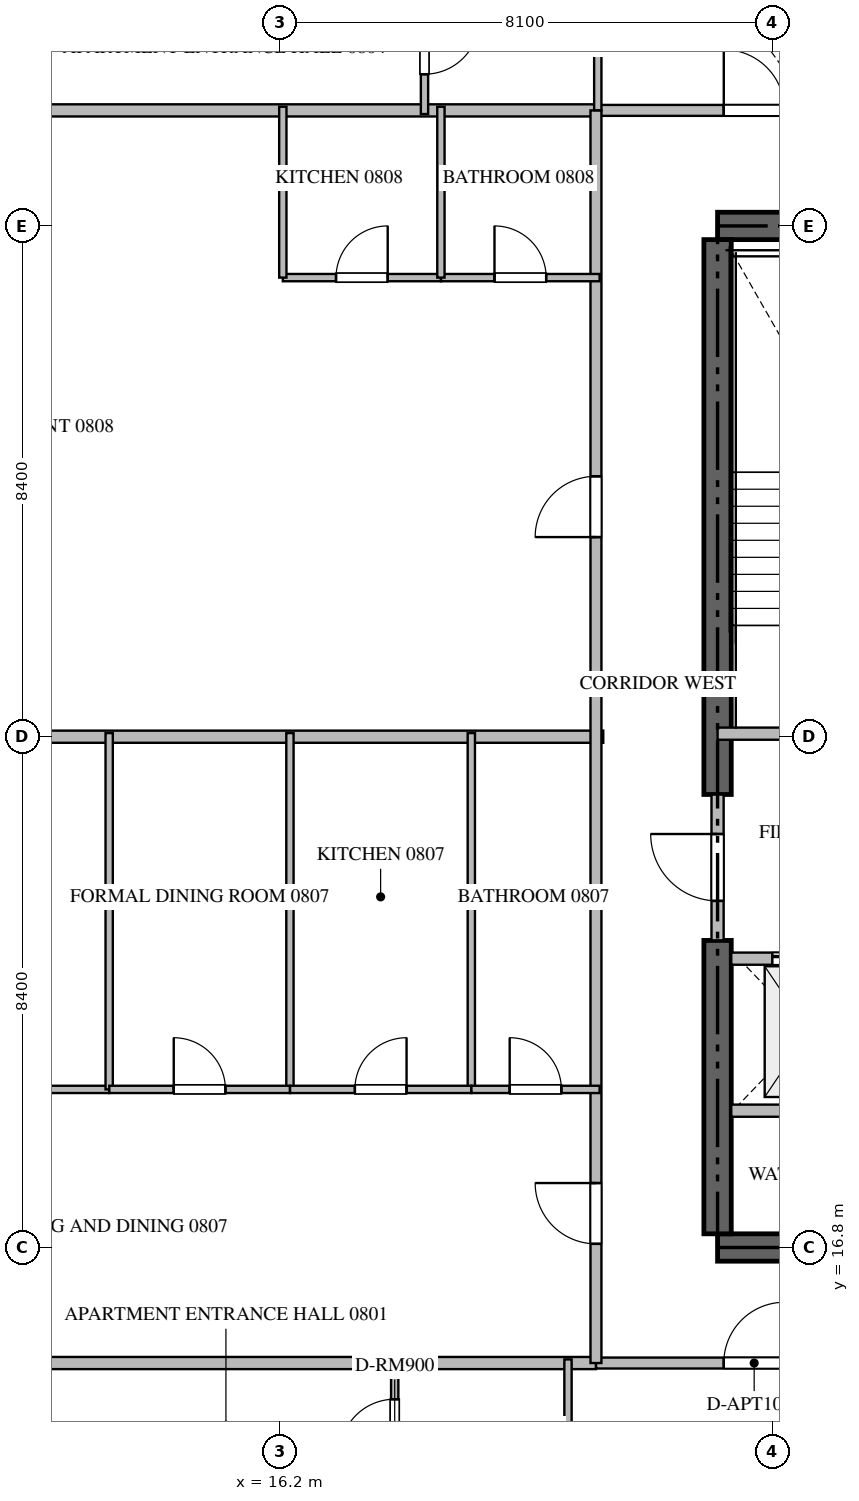
"""IFC4 building model, lengths in metres.
Left out: names, types, materials, properties, quantities, classifications, styles, units other than length and angle.
Written with IfcOpenShell. Run it as: python <this file> out.ifc"""

import sys

from ifc_helpers import new_model, si_unit, direction, frame, frame_2d, origin, place, context, subcontext, project, spatial, rectangle, extrude, source, transform, mapped, element, fill, save


model = new_model("IFC4")
c1 = context("Model", 3, precision=1e-05, world=origin(), true_north=direction((0.0, 1.0)))
c2 = subcontext(c1, "Body", "Model", "MODEL_VIEW")
j1 = project(units=[si_unit("LENGTHUNIT", "METRE"), si_unit("PLANEANGLEUNIT", "RADIAN")], contexts=[c1])
p1 = place(None, origin())
s1 = spatial("IfcSite", under=j1, at=p1, CompositionType="ELEMENT")
p2 = place(p1, origin())
s2 = spatial("IfcBuilding", under=s1, at=p2, CompositionType="ELEMENT")
p3 = place(p2, frame((0.0, 0.0, 37.95)))
s3 = spatial("IfcBuildingStorey", under=s2, at=p3, CompositionType="ELEMENT", Elevation=37.95)
for number, where, z_axis, x_axis in (
    (1, (23.4, 16.8, -0.26), (0.0, 0.0, 1.0), (1.0, 0.0, 0.0)),
    (2, (41.4, 33.6, -0.26), (0.0, 0.0, 1.0), (-1.0, 0.0, 0.0)),
):
    element("IfcWall", number, at=place(p3, frame(where, z_axis=z_axis, x_axis=x_axis)), inside=s3, PredefinedType="SHEAR", context=c2, shape_type="SweptSolid", body=[
        extrude(rectangle(XDim=18.0, YDim=0.45, at=frame_2d((9.0, 0.0))), origin(), (0.0, 0.0, 1.0), 3.748),
    ])
p4 = place(p3, frame((23.4, 17.025, -0.26), z_axis=(0.0, 0.0, 1.0), x_axis=(0.0, 1.0, 0.0)))
e3 = element("IfcWall", 3, at=p4, inside=s3, PredefinedType="SHEAR", context=c2, shape_type="SweptSolid", body=[
    extrude(rectangle(XDim=4.825, YDim=0.45, at=frame_2d((2.413, 0.0))), origin(), (0.0, 0.0, 1.0), 3.748),
])
p5 = place(p3, frame((23.4, 24.25, -0.26), z_axis=(0.0, 0.0, 1.0), x_axis=(0.0, 1.0, 0.0)))
e4 = element("IfcWall", 4, at=p5, inside=s3, PredefinedType="SHEAR", context=c2, shape_type="SweptSolid", body=[
    extrude(rectangle(XDim=9.125, YDim=0.45, at=frame_2d((4.562, 0.0))), origin(), (0.0, 0.0, 1.0), 3.748),
])
p6 = place(p3, frame((23.4, 25.25, 0.0), z_axis=(0.0, 0.0, 1.0), x_axis=(1.0, 0.0, 0.0)))
e5 = element("IfcWall", 5, at=p6, inside=s3, PredefinedType="STANDARD", context=c2, shape_type="SweptSolid", body=[
    extrude(rectangle(XDim=4.45, YDim=0.2, at=frame_2d((2.225, 0.0))), origin(), (0.0, 0.0, 1.0), 3.49),
])
p7 = place(p6, frame((1.65, 0.0, 0.0)))
e6 = element("IfcOpeningElement", 6, at=p7, cuts=e5, PredefinedType="OPENING", context=c2, shape_type="SweptSolid", body=[
    extrude(rectangle(XDim=1.1, YDim=2.15, at=frame_2d((0.55, 1.075))), frame((0.0, 0.11, 0.0), z_axis=(0.0, -1.0, 0.0), x_axis=(1.0, 0.0, 0.0)), (0.0, 0.0, 1.0), 0.22),
])
p8 = place(p3, frame((23.625, 21.55, 0.0), z_axis=(0.0, 0.0, 1.0), x_axis=(1.0, 0.0, 0.0)))
e7 = element("IfcWall", 7, at=p8, inside=s3, PredefinedType="STANDARD", context=c2, shape_type="SweptSolid", body=[
    extrude(rectangle(XDim=2.425, YDim=0.2, at=frame_2d((1.212, 0.0))), origin(), (0.0, 0.0, 1.0), 3.49),
])
p9 = place(p8, frame((0.675, 0.0, 0.0)))
e8 = element("IfcOpeningElement", 8, at=p9, cuts=e7, PredefinedType="OPENING", context=c2, shape_type="SweptSolid", body=[
    extrude(rectangle(XDim=1.2, YDim=2.2, at=frame_2d((0.6, 1.1))), frame((0.0, 0.11, 0.0), z_axis=(0.0, -1.0, 0.0), x_axis=(1.0, 0.0, 0.0)), (0.0, 0.0, 1.0), 0.22),
])
p10 = place(p3, frame((23.625, 19.05, 0.0), z_axis=(0.0, 0.0, 1.0), x_axis=(1.0, 0.0, 0.0)))
e9 = element("IfcWall", 9, at=p10, inside=s3, PredefinedType="STANDARD", context=c2, shape_type="SweptSolid", body=[
    extrude(rectangle(XDim=2.425, YDim=0.2, at=frame_2d((1.212, 0.0))), origin(), (0.0, 0.0, 1.0), 3.49),
])
p11 = place(p3, frame((23.4, 21.852, 0.0), z_axis=(0.0, 0.0, 1.0), x_axis=(0.0, 1.0, 0.0)))
e10 = element("IfcWall", 10, at=p11, inside=s3, PredefinedType="STANDARD", context=c2, shape_type="SweptSolid", body=[
    extrude(rectangle(XDim=2.396, YDim=0.2, at=frame_2d((1.198, 0.0))), origin(), (0.0, 0.0, 1.0), 3.49),
])
p12 = place(p11, frame((0.648, 0.0, 0.0)))
e11 = element("IfcOpeningElement", 11, at=p12, cuts=e10, PredefinedType="OPENING", context=c2, shape_type="SweptSolid", body=[
    extrude(rectangle(XDim=1.1, YDim=2.15, at=frame_2d((0.55, 1.075))), frame((0.0, 0.11, 0.0), z_axis=(0.0, -1.0, 0.0), x_axis=(1.0, 0.0, 0.0)), (0.0, 0.0, 1.0), 0.22),
])
p13 = place(p3, frame((6.082, 25.2, 0.0), z_axis=(0.0, 0.0, 1.0), x_axis=(1.0, 0.0, 0.0)))
e12 = element("IfcWall", 12, at=p13, inside=s3, PredefinedType="PARTITIONING", context=c2, shape_type="SweptSolid", body=[
    extrude(rectangle(XDim=15.438, YDim=0.2, at=frame_2d((7.719, 0.0))), origin(), (0.0, 0.0, 1.0), 3.49),
])
for number, where, z_axis, x_axis in (
    (13, (6.082, 14.9, 0.0), (0.0, 0.0, 1.0), (1.0, 0.0, 0.0)),
    (14, (6.082, 35.5, 0.0), (0.0, 0.0, 1.0), (1.0, 0.0, 0.0)),
):
    element("IfcWall", number, at=place(p3, frame(where, z_axis=z_axis, x_axis=x_axis)), inside=s3, PredefinedType="PARTITIONING", context=c2, shape_type="SweptSolid", body=[
        extrude(rectangle(XDim=15.318, YDim=0.2, at=frame_2d((7.659, 0.0))), origin(), (0.0, 0.0, 1.0), 3.49),
    ])
p14 = place(p3, frame((21.402, 14.9, 0.0), z_axis=(0.0, 0.0, 1.0), x_axis=(1.0, 0.0, 0.0)))
e15 = element("IfcWall", 15, at=p14, inside=s3, PredefinedType="PARTITIONING", context=c2, shape_type="SweptSolid", body=[
    extrude(rectangle(XDim=21.996, YDim=0.18, at=frame_2d((10.998, 0.0))), origin(), (0.0, 0.0, 1.0), 3.49),
])
p15 = place(p14, frame((2.1, 0.0, 0.0)))
e16 = element("IfcOpeningElement", 16, at=p15, cuts=e15, PredefinedType="OPENING", context=c2, shape_type="SweptSolid", body=[
    extrude(rectangle(XDim=1.0, YDim=2.15, at=frame_2d((0.5, 1.075))), frame((0.0, 0.1, 0.0), z_axis=(0.0, -1.0, 0.0), x_axis=(1.0, 0.0, 0.0)), (0.0, 0.0, 1.0), 0.2),
])
p16 = place(p14, frame((14.109, 0.0, 0.0)))
e17 = element("IfcOpeningElement", 17, at=p16, cuts=e15, PredefinedType="OPENING", context=c2, shape_type="SweptSolid", body=[
    extrude(rectangle(XDim=1.0, YDim=2.15, at=frame_2d((0.5, 1.075))), frame((0.0, 0.1, 0.0), z_axis=(0.0, -1.0, 0.0), x_axis=(1.0, 0.0, 0.0)), (0.0, 0.0, 1.0), 0.2),
])
p17 = place(p14, frame((18.896, 0.0, 0.0)))
e18 = element("IfcOpeningElement", 18, at=p17, cuts=e15, PredefinedType="OPENING", context=c2, shape_type="SweptSolid", body=[
    extrude(rectangle(XDim=1.0, YDim=2.15, at=frame_2d((0.5, 1.075))), frame((0.0, 0.1, 0.0), z_axis=(0.0, -1.0, 0.0), x_axis=(1.0, 0.0, 0.0)), (0.0, 0.0, 1.0), 0.2),
])
p18 = place(p3, frame((21.402, 35.5, 0.0), z_axis=(0.0, 0.0, 1.0), x_axis=(1.0, 0.0, 0.0)))
e19 = element("IfcWall", 19, at=p18, inside=s3, PredefinedType="PARTITIONING", context=c2, shape_type="SweptSolid", body=[
    extrude(rectangle(XDim=21.996, YDim=0.18, at=frame_2d((10.998, 0.0))), origin(), (0.0, 0.0, 1.0), 3.49),
])
p19 = place(p18, frame((2.1, 0.0, 0.0)))
e20 = element("IfcOpeningElement", 20, at=p19, cuts=e19, PredefinedType="OPENING", context=c2, shape_type="SweptSolid", body=[
    extrude(rectangle(XDim=1.0, YDim=2.15, at=frame_2d((0.5, 1.075))), frame((0.0, 0.1, 0.0), z_axis=(0.0, -1.0, 0.0), x_axis=(1.0, 0.0, 0.0)), (0.0, 0.0, 1.0), 0.2),
])
p20 = place(p18, frame((10.498, 0.0, 0.0)))
e21 = element("IfcOpeningElement", 21, at=p20, cuts=e19, PredefinedType="OPENING", context=c2, shape_type="SweptSolid", body=[
    extrude(rectangle(XDim=1.0, YDim=2.15, at=frame_2d((0.5, 1.075))), frame((0.0, 0.1, 0.0), z_axis=(0.0, -1.0, 0.0), x_axis=(1.0, 0.0, 0.0)), (0.0, 0.0, 1.0), 0.2),
])
p21 = place(p18, frame((16.272, 0.0, 0.0)))
e22 = element("IfcOpeningElement", 22, at=p21, cuts=e19, PredefinedType="OPENING", context=c2, shape_type="SweptSolid", body=[
    extrude(rectangle(XDim=1.0, YDim=2.15, at=frame_2d((0.5, 1.075))), frame((0.0, 0.1, 0.0), z_axis=(0.0, -1.0, 0.0), x_axis=(1.0, 0.0, 0.0)), (0.0, 0.0, 1.0), 0.2),
])
p22 = place(p3, frame((21.4, 14.9, 0.0), z_axis=(0.0, 0.0, 1.0), x_axis=(0.0, 1.0, 0.0)))
e23 = element("IfcWall", 23, at=p22, inside=s3, PredefinedType="PARTITIONING", context=c2, shape_type="SweptSolid", body=[
    extrude(rectangle(XDim=20.6, YDim=0.18, at=frame_2d((10.3, 0.0))), origin(), (0.0, 0.0, 1.0), 3.49),
])
p23 = place(p22, frame((1.96, 0.0, 0.0)))
e24 = element("IfcOpeningElement", 24, at=p23, cuts=e23, PredefinedType="OPENING", context=c2, shape_type="SweptSolid", body=[
    extrude(rectangle(XDim=1.0, YDim=2.15, at=frame_2d((0.5, 1.075))), frame((0.0, 0.1, 0.0), z_axis=(0.0, -1.0, 0.0), x_axis=(1.0, 0.0, 0.0)), (0.0, 0.0, 1.0), 0.2),
])
p24 = place(p22, frame((13.583, 0.0, 0.0)))
e25 = element("IfcOpeningElement", 25, at=p24, cuts=e23, PredefinedType="OPENING", context=c2, shape_type="SweptSolid", body=[
    extrude(rectangle(XDim=1.0, YDim=2.15, at=frame_2d((0.5, 1.075))), frame((0.0, 0.1, 0.0), z_axis=(0.0, -1.0, 0.0), x_axis=(1.0, 0.0, 0.0)), (0.0, 0.0, 1.0), 0.2),
])
p25 = place(p3, frame((20.94, 12.15, 0.0), z_axis=(0.0, 0.0, 1.0), x_axis=(0.0, 1.0, 0.0)))
e26 = element("IfcWall", 26, at=p25, inside=s3, PredefinedType="PARTITIONING", context=c2, shape_type="SweptSolid", body=[
    extrude(rectangle(XDim=2.81, YDim=0.12, at=frame_2d((1.405, 0.0))), origin(), (0.0, 0.0, 1.0), 3.49),
])
p26 = place(p3, frame((18.09, 12.75, 0.0), z_axis=(0.0, 0.0, 1.0), x_axis=(0.0, 1.0, 0.0)))
e27 = element("IfcWall", 27, at=p26, inside=s3, PredefinedType="PARTITIONING", context=c2, shape_type="SweptSolid", body=[
    extrude(rectangle(XDim=2.21, YDim=0.12, at=frame_2d((1.105, 0.0))), origin(), (0.0, 0.0, 1.0), 3.49),
])
p27 = place(p26, frame((0.655, 0.0, 0.0)))
e28 = element("IfcOpeningElement", 28, at=p27, cuts=e27, PredefinedType="OPENING", context=c2, shape_type="SweptSolid", body=[
    extrude(rectangle(XDim=0.9, YDim=2.1, at=frame_2d((0.45, 1.05))), frame((0.0, 0.07, 0.0), z_axis=(0.0, -1.0, 0.0), x_axis=(1.0, 0.0, 0.0)), (0.0, 0.0, 1.0), 0.14),
])
p28 = place(p3, frame((21.43, 38.25, 0.0), z_axis=(0.0, 0.0, 1.0), x_axis=(0.0, -1.0, 0.0)))
e29 = element("IfcWall", 29, at=p28, inside=s3, PredefinedType="PARTITIONING", context=c2, shape_type="SweptSolid", body=[
    extrude(rectangle(XDim=2.748, YDim=0.12, at=frame_2d((1.374, 0.0))), origin(), (0.0, 0.0, 1.0), 3.49),
])
p29 = place(p3, frame((18.58, 37.65, 0.0), z_axis=(0.0, 0.0, 1.0), x_axis=(0.0, -1.0, 0.0)))
e30 = element("IfcWall", 30, at=p29, inside=s3, PredefinedType="PARTITIONING", context=c2, shape_type="SweptSolid", body=[
    extrude(rectangle(XDim=2.21, YDim=0.12, at=frame_2d((1.105, 0.0))), origin(), (0.0, 0.0, 1.0), 3.49),
])
p30 = place(p29, frame((0.655, 0.0, 0.0)))
e31 = element("IfcOpeningElement", 31, at=p30, cuts=e30, PredefinedType="OPENING", context=c2, shape_type="SweptSolid", body=[
    extrude(rectangle(XDim=0.9, YDim=2.1, at=frame_2d((0.45, 1.05))), frame((0.0, 0.07, 0.0), z_axis=(0.0, -1.0, 0.0), x_axis=(1.0, 0.0, 0.0)), (0.0, 0.0, 1.0), 0.14),
])
p31 = place(p3, frame((6.095, 19.4, 0.0), z_axis=(0.0, 0.0, 1.0), x_axis=(1.0, 0.0, 0.0)))
e32 = element("IfcWall", 32, at=p31, inside=s3, PredefinedType="PARTITIONING", context=c2, shape_type="SweptSolid", body=[
    extrude(rectangle(XDim=7.299, YDim=0.12, at=frame_2d((3.649, 0.0))), origin(), (0.0, 0.0, 1.0), 3.49),
])
p32 = place(p31, frame((3.519, 0.0, 0.0)))
e33 = element("IfcOpeningElement", 33, at=p32, cuts=e32, PredefinedType="OPENING", context=c2, shape_type="SweptSolid", body=[
    extrude(rectangle(XDim=0.9, YDim=2.1, at=frame_2d((0.45, 1.05))), frame((0.0, 0.07, 0.0), z_axis=(0.0, -1.0, 0.0), x_axis=(1.0, 0.0, 0.0)), (0.0, 0.0, 1.0), 0.14),
])
for number, where, z_axis, x_axis in (
    (34, (13.394, 19.4, 0.0), (0.0, 0.0, 1.0), (0.0, 1.0, 0.0)),
    (35, (16.367, 19.4, 0.0), (0.0, 0.0, 1.0), (0.0, 1.0, 0.0)),
    (36, (19.35, 19.4, 0.0), (0.0, 0.0, 1.0), (0.0, 1.0, 0.0)),
):
    element("IfcWall", number, at=place(p3, frame(where, z_axis=z_axis, x_axis=x_axis)), inside=s3, PredefinedType="PARTITIONING", context=c2, shape_type="SweptSolid", body=[
        extrude(rectangle(XDim=5.86, YDim=0.12, at=frame_2d((2.93, 0.0))), origin(), (0.0, 0.0, 1.0), 3.49),
    ])
p33 = place(p3, frame((13.396, 19.4, 0.0), z_axis=(0.0, 0.0, 1.0), x_axis=(1.0, 0.0, 0.0)))
e37 = element("IfcWall", 37, at=p33, inside=s3, PredefinedType="PARTITIONING", context=c2, shape_type="SweptSolid", body=[
    extrude(rectangle(XDim=2.971, YDim=0.12, at=frame_2d((1.485, 0.0))), origin(), (0.0, 0.0, 1.0), 3.49),
])
p34 = place(p33, frame((1.06, 0.0, 0.0)))
e38 = element("IfcOpeningElement", 38, at=p34, cuts=e37, PredefinedType="OPENING", context=c2, shape_type="SweptSolid", body=[
    extrude(rectangle(XDim=0.85, YDim=2.1, at=frame_2d((0.425, 1.05))), frame((0.0, 0.07, 0.0), z_axis=(0.0, -1.0, 0.0), x_axis=(1.0, 0.0, 0.0)), (0.0, 0.0, 1.0), 0.14),
])
p35 = place(p3, frame((16.369, 19.4, 0.0), z_axis=(0.0, 0.0, 1.0), x_axis=(1.0, 0.0, 0.0)))
e39 = element("IfcWall", 39, at=p35, inside=s3, PredefinedType="PARTITIONING", context=c2, shape_type="SweptSolid", body=[
    extrude(rectangle(XDim=2.981, YDim=0.12, at=frame_2d((1.491, 0.0))), origin(), (0.0, 0.0, 1.0), 3.49),
])
p36 = place(p35, frame((1.066, 0.0, 0.0)))
e40 = element("IfcOpeningElement", 40, at=p36, cuts=e39, PredefinedType="OPENING", context=c2, shape_type="SweptSolid", body=[
    extrude(rectangle(XDim=0.85, YDim=2.1, at=frame_2d((0.425, 1.05))), frame((0.0, 0.07, 0.0), z_axis=(0.0, -1.0, 0.0), x_axis=(1.0, 0.0, 0.0)), (0.0, 0.0, 1.0), 0.14),
])
p37 = place(p3, frame((19.352, 19.4, 0.0), z_axis=(0.0, 0.0, 1.0), x_axis=(1.0, 0.0, 0.0)))
e41 = element("IfcWall", 41, at=p37, inside=s3, PredefinedType="PARTITIONING", context=c2, shape_type="SweptSolid", body=[
    extrude(rectangle(XDim=2.108, YDim=0.12, at=frame_2d((1.054, 0.0))), origin(), (0.0, 0.0, 1.0), 3.49),
])
p38 = place(p37, frame((0.629, 0.0, 0.0)))
e42 = element("IfcOpeningElement", 42, at=p38, cuts=e41, PredefinedType="OPENING", context=c2, shape_type="SweptSolid", body=[
    extrude(rectangle(XDim=0.85, YDim=2.1, at=frame_2d((0.425, 1.05))), frame((0.0, 0.07, 0.0), z_axis=(0.0, -1.0, 0.0), x_axis=(1.0, 0.0, 0.0)), (0.0, 0.0, 1.0), 0.14),
])
p39 = place(p3, frame((16.25, 32.75, 0.0), z_axis=(0.0, 0.0, 1.0), x_axis=(1.0, 0.0, 0.0)))
e43 = element("IfcWall", 43, at=p39, inside=s3, PredefinedType="PARTITIONING", context=c2, shape_type="SweptSolid", body=[
    extrude(rectangle(XDim=2.6, YDim=0.12, at=frame_2d((1.3, 0.0))), origin(), (0.0, 0.0, 1.0), 3.49),
])
p40 = place(p39, frame((0.875, 0.0, 0.0)))
e44 = element("IfcOpeningElement", 44, at=p40, cuts=e43, PredefinedType="OPENING", context=c2, shape_type="SweptSolid", body=[
    extrude(rectangle(XDim=0.85, YDim=2.1, at=frame_2d((0.425, 1.05))), frame((0.0, 0.07, 0.0), z_axis=(0.0, -1.0, 0.0), x_axis=(1.0, 0.0, 0.0)), (0.0, 0.0, 1.0), 0.14),
])
p41 = place(p3, frame((18.852, 32.75, 0.0), z_axis=(0.0, 0.0, 1.0), x_axis=(1.0, 0.0, 0.0)))
e45 = element("IfcWall", 45, at=p41, inside=s3, PredefinedType="PARTITIONING", context=c2, shape_type="SweptSolid", body=[
    extrude(rectangle(XDim=2.608, YDim=0.12, at=frame_2d((1.304, 0.0))), origin(), (0.0, 0.0, 1.0), 3.49),
])
p42 = place(p41, frame((0.879, 0.0, 0.0)))
e46 = element("IfcOpeningElement", 46, at=p42, cuts=e45, PredefinedType="OPENING", context=c2, shape_type="SweptSolid", body=[
    extrude(rectangle(XDim=0.85, YDim=2.1, at=frame_2d((0.425, 1.05))), frame((0.0, 0.07, 0.0), z_axis=(0.0, -1.0, 0.0), x_axis=(1.0, 0.0, 0.0)), (0.0, 0.0, 1.0), 0.14),
])
for number, where, z_axis, x_axis in (
    (47, (18.85, 32.75, 0.0), (0.0, 0.0, 1.0), (0.0, 1.0, 0.0)),
    (48, (16.25, 32.75, 0.0), (0.0, 0.0, 1.0), (0.0, 1.0, 0.0)),
):
    element("IfcWall", number, at=place(p3, frame(where, z_axis=z_axis, x_axis=x_axis)), inside=s3, PredefinedType="PARTITIONING", context=c2, shape_type="SweptSolid", body=[
        extrude(rectangle(XDim=2.81, YDim=0.12, at=frame_2d((1.405, 0.0))), origin(), (0.0, 0.0, 1.0), 3.49),
    ])
m1 = source(origin(), c2, "Body", "SweptSolid", [
    extrude(rectangle(XDim=1.2, YDim=2.2, at=frame_2d((0.6, 1.1))), frame((0.0, 0.025, 0.0), z_axis=(0.0, -1.0, 0.0), x_axis=(1.0, 0.0, 0.0)), (0.0, 0.0, 1.0), 0.05),
])
p43 = place(p9, origin())
e49 = element("IfcDoor", 49, at=p43, inside=s3, OperationType="DOUBLE_DOOR_SLIDING", PredefinedType="DOOR", context=c2, shape_type="MappedRepresentation", body=[
    mapped(m1, transform((0.0, 0.0, 0.0), scale=1.0)),
])
fill(e8, e49)
m2 = source(origin(), c2, "Body", "SweptSolid", [
    extrude(rectangle(XDim=1.1, YDim=2.15, at=frame_2d((0.55, 1.075))), frame((0.0, 0.025, 0.0), z_axis=(0.0, -1.0, 0.0), x_axis=(1.0, 0.0, 0.0)), (0.0, 0.0, 1.0), 0.05),
])
p44 = place(p12, origin())
e50 = element("IfcDoor", 50, at=p44, inside=s3, OperationType="SINGLE_SWING_RIGHT", PredefinedType="DOOR", context=c2, shape_type="MappedRepresentation", body=[
    mapped(m2, transform((0.0, 0.0, 0.0), scale=1.0)),
])
fill(e11, e50)
m3 = source(origin(), c2, "Body", "SweptSolid", [
    extrude(rectangle(XDim=1.0, YDim=2.15, at=frame_2d((0.5, 1.075))), frame((0.0, 0.025, 0.0), z_axis=(0.0, -1.0, 0.0), x_axis=(1.0, 0.0, 0.0)), (0.0, 0.0, 1.0), 0.05),
])
p45 = place(p15, origin())
e51 = element("IfcDoor", 51, at=p45, inside=s3, OperationType="SINGLE_SWING_RIGHT", PredefinedType="DOOR", context=c2, shape_type="MappedRepresentation", body=[
    mapped(m3, transform((0.0, 0.0, 0.0), scale=1.0)),
])
fill(e16, e51)
p46 = place(p19, origin())
e52 = element("IfcDoor", 52, at=p46, inside=s3, OperationType="SINGLE_SWING_LEFT", PredefinedType="DOOR", context=c2, shape_type="MappedRepresentation", body=[
    mapped(m3, transform((0.0, 0.0, 0.0), scale=1.0)),
])
fill(e20, e52)
p47 = place(p23, origin())
e53 = element("IfcDoor", 53, at=p47, inside=s3, OperationType="SINGLE_SWING_RIGHT", PredefinedType="DOOR", context=c2, shape_type="MappedRepresentation", body=[
    mapped(m3, transform((0.0, 0.0, 0.0), scale=1.0)),
])
fill(e24, e53)
p48 = place(p24, origin())
e54 = element("IfcDoor", 54, at=p48, inside=s3, OperationType="SINGLE_SWING_LEFT", PredefinedType="DOOR", context=c2, shape_type="MappedRepresentation", body=[
    mapped(m3, transform((0.0, 0.0, 0.0), scale=1.0)),
])
fill(e25, e54)
m4 = source(origin(), c2, "Body", "SweptSolid", [
    extrude(rectangle(XDim=0.9, YDim=2.1, at=frame_2d((0.45, 1.05))), frame((0.0, 0.025, 0.0), z_axis=(0.0, -1.0, 0.0), x_axis=(1.0, 0.0, 0.0)), (0.0, 0.0, 1.0), 0.05),
])
p49 = place(p27, origin())
e55 = element("IfcDoor", 55, at=p49, inside=s3, OperationType="SINGLE_SWING_LEFT", PredefinedType="DOOR", context=c2, shape_type="MappedRepresentation", body=[
    mapped(m4, transform((0.0, 0.0, 0.0), scale=1.0)),
])
fill(e28, e55)
p50 = place(p30, origin())
e56 = element("IfcDoor", 56, at=p50, inside=s3, OperationType="SINGLE_SWING_LEFT", PredefinedType="DOOR", context=c2, shape_type="MappedRepresentation", body=[
    mapped(m4, transform((0.0, 0.0, 0.0), scale=1.0)),
])
fill(e31, e56)
m5 = source(origin(), c2, "Body", "SweptSolid", [
    extrude(rectangle(XDim=0.85, YDim=2.1, at=frame_2d((0.425, 1.05))), frame((0.0, 0.025, 0.0), z_axis=(0.0, -1.0, 0.0), x_axis=(1.0, 0.0, 0.0)), (0.0, 0.0, 1.0), 0.05),
])
p51 = place(p34, origin())
e57 = element("IfcDoor", 57, at=p51, inside=s3, OperationType="SINGLE_SWING_LEFT", PredefinedType="DOOR", context=c2, shape_type="MappedRepresentation", body=[
    mapped(m5, transform((0.0, 0.0, 0.0), scale=1.0)),
])
fill(e38, e57)
p52 = place(p36, origin())
e58 = element("IfcDoor", 58, at=p52, inside=s3, OperationType="SINGLE_SWING_RIGHT", PredefinedType="DOOR", context=c2, shape_type="MappedRepresentation", body=[
    mapped(m5, transform((0.0, 0.0, 0.0), scale=1.0)),
])
fill(e40, e58)
p53 = place(p38, origin())
e59 = element("IfcDoor", 59, at=p53, inside=s3, OperationType="SINGLE_SWING_LEFT", PredefinedType="DOOR", context=c2, shape_type="MappedRepresentation", body=[
    mapped(m5, transform((0.0, 0.0, 0.0), scale=1.0)),
])
fill(e42, e59)
p54 = place(p40, origin())
e60 = element("IfcDoor", 60, at=p54, inside=s3, OperationType="SINGLE_SWING_RIGHT", PredefinedType="DOOR", context=c2, shape_type="MappedRepresentation", body=[
    mapped(m5, transform((0.0, 0.0, 0.0), scale=1.0)),
])
fill(e44, e60)
p55 = place(p42, origin())
e61 = element("IfcDoor", 61, at=p55, inside=s3, OperationType="SINGLE_SWING_LEFT", PredefinedType="DOOR", context=c2, shape_type="MappedRepresentation", body=[
    mapped(m5, transform((0.0, 0.0, 0.0), scale=1.0)),
])
fill(e46, e61)
save(model, sys.argv[1])
